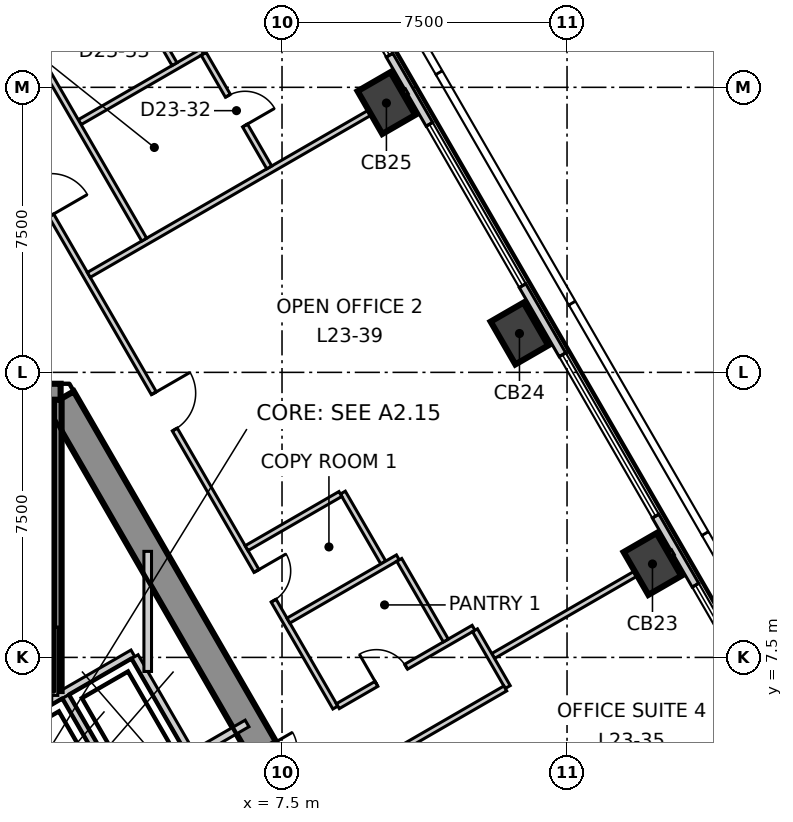
"""IFC4 building model, lengths in metres.
Left out: names, types, materials, properties, quantities, classifications, styles, units other than length and angle.
Written with IfcOpenShell. Run it as: python <this file> out.ifc"""

import sys

from ifc_helpers import new_model, si_unit, direction, frame, frame_2d, origin, origin_2d, place, context, subcontext, project, spatial, polyline, rectangle, outline, extrude, element, fill, save


model = new_model("IFC4")
c1 = context("Model", 3, precision=1e-05, world=origin(), true_north=direction((0.0, 1.0)))
c2 = subcontext(c1, "Body", "Model", "MODEL_VIEW")
j1 = project(units=[si_unit("LENGTHUNIT", "METRE"), si_unit("PLANEANGLEUNIT", "RADIAN")], contexts=[c1])
p1 = place(None, origin())
s1 = spatial("IfcSite", under=j1, at=p1, CompositionType="ELEMENT")
p2 = place(p1, origin())
s2 = spatial("IfcBuilding", under=s1, at=p2, CompositionType="ELEMENT")
p3 = place(p2, frame((0.0, 0.0, 104.3)))
s3 = spatial("IfcBuildingStorey", under=s2, at=p3, CompositionType="ELEMENT", Elevation=104.3)
p4 = place(p3, frame((1.674, 14.3, -0.3), z_axis=(0.0, 0.0, 1.0), x_axis=(-1.0, 0.0, 0.0)))
e1 = element("IfcWall", 1, at=p4, inside=s3, PredefinedType="SHEAR", context=c2, shape_type="SweptSolid", body=[
    extrude(outline(polyline([(-0.231, -0.4), (1.674, -0.4), (3.579, -0.4), (3.117, 0.4), (1.674, 0.4), (0.231, 0.4), (-0.231, -0.4)])), origin(), (0.0, 0.0, 1.0), 4.0),
])
p5 = place(p4, frame((0.974, 0.0, 0.3)))
e2 = element("IfcOpeningElement", 2, at=p5, cuts=e1, PredefinedType="OPENING", context=c2, shape_type="SweptSolid", body=[
    extrude(rectangle(XDim=1.4, YDim=2.1, at=frame_2d((0.7, 1.05))), frame((0.0, 0.41, 0.0), z_axis=(0.0, -1.0, 0.0), x_axis=(1.0, 0.0, 0.0)), (0.0, 0.0, 1.0), 0.82),
])
p6 = place(p3, frame((13.221, -5.7, -0.3), z_axis=(0.0, 0.0, 1.0), x_axis=(-0.499995765644, 0.866027848477, 0.0)))
e3 = element("IfcWall", 3, at=p6, inside=s3, PredefinedType="SHEAR", context=c2, shape_type="SweptSolid", body=[
    extrude(outline(polyline([(-0.231, -0.4), (1.732, -0.4), (3.695, -0.4), (5.658, -0.4), (7.621, -0.4), (9.584, -0.4), (11.547, -0.4), (13.51, -0.4), (15.473, -0.4), (17.436, -0.4), (19.399, -0.4), (21.362, -0.4), (23.325, -0.4), (22.863, 0.4), (20.977, 0.4), (19.091, 0.4), (17.205, 0.4), (15.319, 0.4), (13.433, 0.4), (11.547, 0.4), (9.661, 0.4), (7.775, 0.4), (5.889, 0.4), (4.003, 0.4), (2.117, 0.4), (0.231, 0.4), (-0.231, -0.4)])), origin(), (0.0, 0.0, 1.0), 4.0),
])
p7 = place(p6, frame((10.647, 0.0, 0.3)))
e4 = element("IfcOpeningElement", 4, at=p7, cuts=e3, PredefinedType="OPENING", context=c2, shape_type="SweptSolid", body=[
    extrude(rectangle(XDim=1.8, YDim=2.1, at=frame_2d((0.9, 1.05))), frame((0.0, 0.41, 0.0), z_axis=(0.0, -1.0, 0.0), x_axis=(1.0, 0.0, 0.0)), (0.0, 0.0, 1.0), 0.82),
])
p8 = place(p6, frame((5.343, 0.0, 0.3)))
e5 = element("IfcOpeningElement", 5, at=p8, cuts=e3, PredefinedType="OPENING", context=c2, shape_type="SweptSolid", body=[
    extrude(rectangle(XDim=0.9, YDim=2.1, at=frame_2d((0.45, 1.05))), frame((0.0, 0.41, 0.0), z_axis=(0.0, -1.0, 0.0), x_axis=(1.0, 0.0, 0.0)), (0.0, 0.0, 1.0), 0.82),
])
for number, where, z_axis, x_axis in (
    (6, (17.248, 9.958, -0.3), (0.0, 0.0, 1.0), (-0.5, 0.866, 0.0)),
    (7, (13.748, 16.022, -0.3), (0.0, 0.0, 1.0), (-0.5, 0.866, 0.0)),
    (8, (10.247, 22.086, -0.3), (0.0, 0.0, 1.0), (-0.5, 0.866, 0.0)),
):
    element("IfcColumn", number, at=place(p3, frame(where, z_axis=z_axis, x_axis=x_axis)), inside=s3, PredefinedType="COLUMN", context=c2, shape_type="SweptSolid", body=[
        extrude(rectangle(XDim=1.3, YDim=1.0, at=origin_2d()), origin(), (0.0, 0.0, 1.0), 4.0),
    ])
p9 = place(p3, frame((32.51, -15.074, 0.0), z_axis=(0.0, 0.0, 1.0), x_axis=(-0.500008323105, 0.866020598384, 0.0)))
e9 = element("IfcWall", 9, at=p9, inside=s3, PredefinedType="ELEMENTEDWALL", context=c2, shape_type="SweptSolid", body=[
    extrude(rectangle(XDim=58.599, YDim=0.2, at=frame_2d((29.3, 0.0))), origin(), (0.0, 0.0, 1.0), 3.7),
])
p10 = place(p9, frame((2.354, 0.0, 0.9)))
e10 = element("IfcOpeningElement", 10, at=p10, cuts=e9, PredefinedType="OPENING", context=c2, shape_type="SweptSolid", body=[
    extrude(rectangle(XDim=4.9, YDim=2.5, at=frame_2d((2.45, 1.25))), frame((0.0, 0.11, 0.0), z_axis=(0.0, -1.0, 0.0), x_axis=(1.0, 0.0, 0.0)), (0.0, 0.0, 1.0), 0.22),
])
p11 = place(p9, frame((9.355, 0.0, 0.9)))
e11 = element("IfcOpeningElement", 11, at=p11, cuts=e9, PredefinedType="OPENING", context=c2, shape_type="SweptSolid", body=[
    extrude(rectangle(XDim=4.9, YDim=2.5, at=frame_2d((2.45, 1.25))), frame((0.0, 0.11, 0.0), z_axis=(0.0, -1.0, 0.0), x_axis=(1.0, 0.0, 0.0)), (0.0, 0.0, 1.0), 0.22),
])
p12 = place(p9, frame((16.357, 0.0, 0.9)))
e12 = element("IfcOpeningElement", 12, at=p12, cuts=e9, PredefinedType="OPENING", context=c2, shape_type="SweptSolid", body=[
    extrude(rectangle(XDim=4.9, YDim=2.5, at=frame_2d((2.45, 1.25))), frame((0.0, 0.11, 0.0), z_axis=(0.0, -1.0, 0.0), x_axis=(1.0, 0.0, 0.0)), (0.0, 0.0, 1.0), 0.22),
])
p13 = place(p9, frame((23.359, 0.0, 0.9)))
e13 = element("IfcOpeningElement", 13, at=p13, cuts=e9, PredefinedType="OPENING", context=c2, shape_type="SweptSolid", body=[
    extrude(rectangle(XDim=4.9, YDim=2.5, at=frame_2d((2.45, 1.25))), frame((0.0, 0.11, 0.0), z_axis=(0.0, -1.0, 0.0), x_axis=(1.0, 0.0, 0.0)), (0.0, 0.0, 1.0), 0.22),
])
p14 = place(p9, frame((30.36, 0.0, 0.9)))
e14 = element("IfcOpeningElement", 14, at=p14, cuts=e9, PredefinedType="OPENING", context=c2, shape_type="SweptSolid", body=[
    extrude(rectangle(XDim=4.9, YDim=2.5, at=frame_2d((2.45, 1.25))), frame((0.0, 0.11, 0.0), z_axis=(0.0, -1.0, 0.0), x_axis=(1.0, 0.0, 0.0)), (0.0, 0.0, 1.0), 0.22),
])
p15 = place(p9, frame((37.362, 0.0, 0.9)))
e15 = element("IfcOpeningElement", 15, at=p15, cuts=e9, PredefinedType="OPENING", context=c2, shape_type="SweptSolid", body=[
    extrude(rectangle(XDim=4.9, YDim=2.5, at=frame_2d((2.45, 1.25))), frame((0.0, 0.11, 0.0), z_axis=(0.0, -1.0, 0.0), x_axis=(1.0, 0.0, 0.0)), (0.0, 0.0, 1.0), 0.22),
])
p16 = place(p9, frame((44.364, 0.0, 0.9)))
e16 = element("IfcOpeningElement", 16, at=p16, cuts=e9, PredefinedType="OPENING", context=c2, shape_type="SweptSolid", body=[
    extrude(rectangle(XDim=4.9, YDim=2.5, at=frame_2d((2.45, 1.25))), frame((0.0, 0.11, 0.0), z_axis=(0.0, -1.0, 0.0), x_axis=(1.0, 0.0, 0.0)), (0.0, 0.0, 1.0), 0.22),
])
p17 = place(p9, frame((51.365, 0.0, 0.9)))
e17 = element("IfcOpeningElement", 17, at=p17, cuts=e9, PredefinedType="OPENING", context=c2, shape_type="SweptSolid", body=[
    extrude(rectangle(XDim=4.9, YDim=2.5, at=frame_2d((2.45, 1.25))), frame((0.0, 0.11, 0.0), z_axis=(0.0, -1.0, 0.0), x_axis=(1.0, 0.0, 0.0)), (0.0, 0.0, 1.0), 0.22),
])
p18 = place(p3, frame((13.055, 7.537, 0.0), z_axis=(0.0, 0.0, 1.0), x_axis=(0.86601735395, 0.500013942463, 0.0)))
e18 = element("IfcWall", 18, at=p18, inside=s3, PredefinedType="PARTITIONING", context=c2, shape_type="SweptSolid", body=[
    extrude(rectangle(XDim=5.462, YDim=0.15, at=frame_2d((2.731, 0.0))), origin(), (0.0, 0.0, 1.0), 3.2),
])
p19 = place(p3, frame((0.076, 21.468, 0.0), z_axis=(0.0, 0.0, 1.0), x_axis=(0.500024127084, -0.866011473558, 0.0)))
e19 = element("IfcWall", 19, at=p19, inside=s3, PredefinedType="PARTITIONING", context=c2, shape_type="SweptSolid", body=[
    extrude(rectangle(XDim=17.654, YDim=0.15, at=frame_2d((8.827, 0.0))), origin(), (0.0, 0.0, 1.0), 3.7),
])
p20 = place(p19, frame((8.104, 0.0, 0.0)))
e20 = element("IfcOpeningElement", 20, at=p20, cuts=e19, PredefinedType="OPENING", context=c2, shape_type="SweptSolid", body=[
    extrude(rectangle(XDim=1.1, YDim=2.1, at=frame_2d((0.55, 1.05))), frame((0.0, 0.085, 0.0), z_axis=(0.0, -1.0, 0.0), x_axis=(1.0, 0.0, 0.0)), (0.0, 0.0, 1.0), 0.17),
])
p21 = place(p19, frame((13.504, 0.0, 0.0)))
e21 = element("IfcOpeningElement", 21, at=p21, cuts=e19, PredefinedType="OPENING", context=c2, shape_type="SweptSolid", body=[
    extrude(rectangle(XDim=0.9, YDim=2.1, at=frame_2d((0.45, 1.05))), frame((0.0, 0.085, 0.0), z_axis=(0.0, -1.0, 0.0), x_axis=(1.0, 0.0, 0.0)), (0.0, 0.0, 1.0), 0.17),
])
p22 = place(p19, frame((1.6, 0.0, 0.0)))
e22 = element("IfcOpeningElement", 22, at=p22, cuts=e19, PredefinedType="OPENING", context=c2, shape_type="SweptSolid", body=[
    extrude(rectangle(XDim=1.1, YDim=2.1, at=frame_2d((0.55, 1.05))), frame((0.0, 0.085, 0.0), z_axis=(0.0, -1.0, 0.0), x_axis=(1.0, 0.0, 0.0)), (0.0, 0.0, 1.0), 0.17),
])
p23 = place(p3, frame((2.416, 17.565, 0.0), z_axis=(0.0, 0.0, 1.0), x_axis=(0.86603284879, 0.49998710465, 0.0)))
e23 = element("IfcWall", 23, at=p23, inside=s3, PredefinedType="PARTITIONING", context=c2, shape_type="SweptSolid", body=[
    extrude(rectangle(XDim=9.662, YDim=0.15, at=frame_2d((4.831, 0.0))), origin(), (0.0, 0.0, 1.0), 3.7),
])
p24 = place(p3, frame((9.101, 11.836, 0.0), z_axis=(0.0, 0.0, 1.0), x_axis=(0.500266112279, -0.865871709265, 0.0)))
e24 = element("IfcWall", 24, at=p24, inside=s3, PredefinedType="PARTITIONING", context=c2, shape_type="SweptSolid", body=[
    extrude(rectangle(XDim=2.125, YDim=0.15, at=frame_2d((1.062, 0.0))), origin(), (0.0, 0.0, 1.0), 3.7),
])
p25 = place(p3, frame((6.568, 10.374, 0.0), z_axis=(0.0, 0.0, 1.0), x_axis=(0.865982980443, 0.500073472185, 0.0)))
e25 = element("IfcWall", 25, at=p25, inside=s3, PredefinedType="PARTITIONING", context=c2, shape_type="SweptSolid", body=[
    extrude(rectangle(XDim=2.85, YDim=0.15, at=frame_2d((1.425, 0.0))), origin(), (0.0, 0.0, 1.0), 3.7),
])
p26 = place(p3, frame((7.668, 8.468, 0.0), z_axis=(0.0, 0.0, 1.0), x_axis=(0.865993651241, 0.500054992986, 0.0)))
e26 = element("IfcWall", 26, at=p26, inside=s3, PredefinedType="PARTITIONING", context=c2, shape_type="SweptSolid", body=[
    extrude(rectangle(XDim=3.326, YDim=0.15, at=frame_2d((1.663, 0.0))), origin(), (0.0, 0.0, 1.0), 3.7),
])
p27 = place(p3, frame((8.969, 6.217, 0.0), z_axis=(0.0, 0.0, 1.0), x_axis=(0.865997263264, 0.500048737644, 0.0)))
e27 = element("IfcWall", 27, at=p27, inside=s3, PredefinedType="PARTITIONING", context=c2, shape_type="SweptSolid", body=[
    extrude(rectangle(XDim=4.124, YDim=0.15, at=frame_2d((2.062, 0.0))), origin(), (0.0, 0.0, 1.0), 3.7),
])
p28 = place(p27, frame((1.174, 0.0, 0.0)))
e28 = element("IfcOpeningElement", 28, at=p28, cuts=e27, PredefinedType="OPENING", context=c2, shape_type="SweptSolid", body=[
    extrude(rectangle(XDim=0.9, YDim=2.1, at=frame_2d((0.45, 1.05))), frame((0.0, 0.085, 0.0), z_axis=(0.0, -1.0, 0.0), x_axis=(1.0, 0.0, 0.0)), (0.0, 0.0, 1.0), 0.17),
])
p29 = place(p3, frame((10.585, 10.066, 0.0), z_axis=(0.0, 0.0, 1.0), x_axis=(0.500018594424, -0.866014668023, 0.0)))
e29 = element("IfcWall", 29, at=p29, inside=s3, PredefinedType="PARTITIONING", context=c2, shape_type="SweptSolid", body=[
    extrude(rectangle(XDim=2.45, YDim=0.15, at=frame_2d((1.225, 0.0))), origin(), (0.0, 0.0, 1.0), 3.7),
])
p30 = place(p3, frame((12.578, 8.214, 0.0), z_axis=(0.0, 0.0, 1.0), x_axis=(0.499746958151, -0.866171448282, 0.0)))
e30 = element("IfcWall", 30, at=p30, inside=s3, PredefinedType="PARTITIONING", context=c2, shape_type="SweptSolid", body=[
    extrude(rectangle(XDim=1.725, YDim=0.15, at=frame_2d((0.863, 0.0))), origin(), (0.0, 0.0, 1.0), 3.7),
])
p31 = place(p3, frame((9.869, 4.658, 0.0), z_axis=(0.0, 0.0, 1.0), x_axis=(0.865929493314, 0.500166085025, 0.0)))
e31 = element("IfcWall", 31, at=p31, inside=s3, PredefinedType="PARTITIONING", context=c2, shape_type="SweptSolid", body=[
    extrude(rectangle(XDim=4.049, YDim=0.15, at=frame_2d((2.024, 0.0))), origin(), (0.0, 0.0, 1.0), 3.7),
])
p32 = place(p3, frame((2.175, 21.583, 0.0), z_axis=(0.0, 0.0, 1.0), x_axis=(0.866068800491, 0.499924827166, 0.0)))
e32 = element("IfcWall", 32, at=p32, inside=s3, PredefinedType="PARTITIONING", context=c2, shape_type="SweptSolid", body=[
    extrude(rectangle(XDim=3.725, YDim=0.15, at=frame_2d((1.862, 0.0))), origin(), (0.0, 0.0, 1.0), 3.7),
])
p33 = place(p3, frame((3.608, 24.95, 0.0), z_axis=(0.0, 0.0, 1.0), x_axis=(0.500266112279, -0.865871709265, 0.0)))
e33 = element("IfcWall", 33, at=p33, inside=s3, PredefinedType="PARTITIONING", context=c2, shape_type="SweptSolid", body=[
    extrude(rectangle(XDim=2.125, YDim=0.15, at=frame_2d((1.062, 0.0))), origin(), (0.0, 0.0, 1.0), 3.7),
])
p34 = place(p3, frame((1.01, 23.45, 0.0), z_axis=(0.0, 0.0, 1.0), x_axis=(0.865917290158, 0.500187211558, 0.0)))
e34 = element("IfcWall", 34, at=p34, inside=s3, PredefinedType="PARTITIONING", context=c2, shape_type="SweptSolid", body=[
    extrude(rectangle(XDim=2.925, YDim=0.15, at=frame_2d((1.463, 0.0))), origin(), (0.0, 0.0, 1.0), 3.7),
])
p35 = place(p34, frame((1.05, 0.0, 0.0)))
e35 = element("IfcOpeningElement", 35, at=p35, cuts=e34, PredefinedType="OPENING", context=c2, shape_type="SweptSolid", body=[
    extrude(rectangle(XDim=0.9, YDim=2.1, at=frame_2d((0.45, 1.05))), frame((0.0, 0.085, 0.0), z_axis=(0.0, -1.0, 0.0), x_axis=(1.0, 0.0, 0.0)), (0.0, 0.0, 1.0), 0.17),
])
p36 = place(p3, frame((1.048, 23.385, 0.0), z_axis=(0.0, 0.0, 1.0), x_axis=(0.499991765245, -0.86603015807, 0.0)))
e36 = element("IfcWall", 36, at=p36, inside=s3, PredefinedType="PARTITIONING", context=c2, shape_type="SweptSolid", body=[
    extrude(rectangle(XDim=5.65, YDim=0.15, at=frame_2d((2.825, 0.0))), origin(), (0.0, 0.0, 1.0), 3.7),
])
p37 = place(p3, frame((5.439, 23.38, 0.0), z_axis=(0.0, 0.0, 1.0), x_axis=(0.500020560727, -0.866013532718, 0.0)))
e37 = element("IfcWall", 37, at=p37, inside=s3, PredefinedType="PARTITIONING", context=c2, shape_type="SweptSolid", body=[
    extrude(rectangle(XDim=3.45, YDim=0.15, at=frame_2d((1.725, 0.0))), origin(), (0.0, 0.0, 1.0), 3.7),
])
p38 = place(p37, frame((1.275, 0.0, 0.0)))
e38 = element("IfcOpeningElement", 38, at=p38, cuts=e37, PredefinedType="OPENING", context=c2, shape_type="SweptSolid", body=[
    extrude(rectangle(XDim=0.9, YDim=2.1, at=frame_2d((0.45, 1.05))), frame((0.0, 0.085, 0.0), z_axis=(0.0, -1.0, 0.0), x_axis=(1.0, 0.0, 0.0)), (0.0, 0.0, 1.0), 0.17),
])
p39 = place(p3, frame((-0.002, 5.541, 0.0), z_axis=(0.0, 0.0, 1.0), x_axis=(0.86600155993, 0.500041296494, 0.0)))
e39 = element("IfcWall", 39, at=p39, inside=s3, PredefinedType="SOLIDWALL", context=c2, shape_type="SweptSolid", body=[
    extrude(rectangle(XDim=4.132, YDim=0.2, at=frame_2d((2.066, 0.0))), origin(), (0.0, 0.0, 1.0), 3.7),
])
p40 = place(p3, frame((0.0, 5.4, 0.0), z_axis=(0.0, 0.0, 1.0), x_axis=(0.500103862429, -0.865965430478, 0.0)))
e40 = element("IfcWall", 40, at=p40, inside=s3, PredefinedType="SOLIDWALL", context=c2, shape_type="SweptSolid", body=[
    extrude(rectangle(XDim=2.973, YDim=0.2, at=frame_2d((1.487, 0.0))), origin(), (0.0, 0.0, 1.0), 3.7),
])
p41 = place(p40, frame((0.937, 0.0, 0.0)))
e41 = element("IfcOpeningElement", 41, at=p41, cuts=e40, PredefinedType="OPENING", context=c2, shape_type="SweptSolid", body=[
    extrude(rectangle(XDim=1.1, YDim=2.1, at=frame_2d((0.55, 1.05))), frame((0.0, 0.11, 0.0), z_axis=(0.0, -1.0, 0.0), x_axis=(1.0, 0.0, 0.0)), (0.0, 0.0, 1.0), 0.22),
])
p42 = place(p3, frame((1.577, 2.874, 0.0), z_axis=(0.0, 0.0, 1.0), x_axis=(0.866073694534, 0.499916348638, 0.0)))
e42 = element("IfcWall", 42, at=p42, inside=s3, PredefinedType="SOLIDWALL", context=c2, shape_type="SweptSolid", body=[
    extrude(rectangle(XDim=5.777, YDim=0.2, at=frame_2d((2.888, 0.0))), origin(), (0.0, 0.0, 1.0), 3.7),
])
p43 = place(p42, frame((2.497, 0.0, 0.0)))
e43 = element("IfcOpeningElement", 43, at=p43, cuts=e42, PredefinedType="OPENING", context=c2, shape_type="SweptSolid", body=[
    extrude(rectangle(XDim=1.1, YDim=2.1, at=frame_2d((0.55, 1.05))), frame((0.0, 0.11, 0.0), z_axis=(0.0, -1.0, 0.0), x_axis=(1.0, 0.0, 0.0)), (0.0, 0.0, 1.0), 0.22),
])
for number, where, z_axis, x_axis in (
    (44, (3.626, 7.52, 0.0), (0.0, 0.0, 1.0), (0.5, -0.866, 0.0)),
    (45, (1.807, 6.47, 0.0), (0.0, 0.0, 1.0), (0.5, -0.866, 0.0)),
):
    element("IfcWall", number, at=place(p3, frame(where, z_axis=z_axis, x_axis=x_axis)), inside=s3, PredefinedType="SOLIDWALL", context=c2, shape_type="SweptSolid", body=[
        extrude(rectangle(XDim=2.9, YDim=0.2, at=frame_2d((1.45, 0.0))), origin(), (0.0, 0.0, 1.0), 3.7),
    ])
p44 = place(p3, frame((3.966, 7.13, 0.0), z_axis=(0.0, 0.0, 1.0), x_axis=(0.0, 1.0, 0.0)))
e46 = element("IfcWall", 46, at=p44, inside=s3, PredefinedType="SOLIDWALL", context=c2, shape_type="SweptSolid", body=[
    extrude(rectangle(XDim=3.16, YDim=0.2, at=frame_2d((1.58, 0.0))), origin(), (0.0, 0.0, 1.0), 3.7),
])
p45 = place(p3, frame((1.6, 6.615, 0.0), z_axis=(0.0, 0.0, 1.0), x_axis=(0.0, 1.0, 0.0)))
e47 = element("IfcWall", 47, at=p45, inside=s3, PredefinedType="SOLIDWALL", context=c2, shape_type="SweptSolid", body=[
    extrude(rectangle(XDim=7.665, YDim=0.2, at=frame_2d((3.833, 0.0))), origin(), (0.0, 0.0, 1.0), 3.7),
])
p46 = place(p13, origin())
e48 = element("IfcWindow", 48, at=p46, inside=s3, PartitioningType="SINGLE_PANEL", PredefinedType="WINDOW", context=c2, shape_type="SweptSolid", body=[
    extrude(rectangle(XDim=4.9, YDim=2.5, at=frame_2d((2.45, 1.25))), frame((0.0, 0.03, 0.0), z_axis=(0.0, -1.0, 0.0), x_axis=(1.0, 0.0, 0.0)), (0.0, 0.0, 1.0), 0.06),
])
fill(e13, e48)
p47 = place(p14, origin())
e49 = element("IfcWindow", 49, at=p47, inside=s3, PartitioningType="SINGLE_PANEL", PredefinedType="WINDOW", context=c2, shape_type="SweptSolid", body=[
    extrude(rectangle(XDim=4.9, YDim=2.5, at=frame_2d((2.45, 1.25))), frame((0.0, 0.03, 0.0), z_axis=(0.0, -1.0, 0.0), x_axis=(1.0, 0.0, 0.0)), (0.0, 0.0, 1.0), 0.06),
])
fill(e14, e49)
p48 = place(p15, origin())
e50 = element("IfcWindow", 50, at=p48, inside=s3, PartitioningType="SINGLE_PANEL", PredefinedType="WINDOW", context=c2, shape_type="SweptSolid", body=[
    extrude(rectangle(XDim=4.9, YDim=2.5, at=frame_2d((2.45, 1.25))), frame((0.0, 0.03, 0.0), z_axis=(0.0, -1.0, 0.0), x_axis=(1.0, 0.0, 0.0)), (0.0, 0.0, 1.0), 0.06),
])
fill(e15, e50)
p49 = place(p16, origin())
e51 = element("IfcWindow", 51, at=p49, inside=s3, PartitioningType="SINGLE_PANEL", PredefinedType="WINDOW", context=c2, shape_type="SweptSolid", body=[
    extrude(rectangle(XDim=4.9, YDim=2.5, at=frame_2d((2.45, 1.25))), frame((0.0, 0.03, 0.0), z_axis=(0.0, -1.0, 0.0), x_axis=(1.0, 0.0, 0.0)), (0.0, 0.0, 1.0), 0.06),
])
fill(e16, e51)
p50 = place(p20, origin())
e52 = element("IfcDoor", 52, at=p50, inside=s3, OperationType="SINGLE_SWING_RIGHT", PredefinedType="DOOR", context=c2, shape_type="SweptSolid", body=[
    extrude(rectangle(XDim=1.1, YDim=2.1, at=frame_2d((0.55, 1.05))), frame((0.0, 0.025, 0.0), z_axis=(0.0, -1.0, 0.0), x_axis=(1.0, 0.0, 0.0)), (0.0, 0.0, 1.0), 0.05),
])
fill(e20, e52)
p51 = place(p28, origin())
e53 = element("IfcDoor", 53, at=p51, inside=s3, OperationType="SINGLE_SWING_RIGHT", PredefinedType="DOOR", context=c2, shape_type="SweptSolid", body=[
    extrude(rectangle(XDim=0.9, YDim=2.1, at=frame_2d((0.45, 1.05))), frame((0.0, 0.025, 0.0), z_axis=(0.0, -1.0, 0.0), x_axis=(1.0, 0.0, 0.0)), (0.0, 0.0, 1.0), 0.05),
])
fill(e28, e53)
p52 = place(p21, origin())
e54 = element("IfcDoor", 54, at=p52, inside=s3, OperationType="SINGLE_SWING_RIGHT", PredefinedType="DOOR", context=c2, shape_type="SweptSolid", body=[
    extrude(rectangle(XDim=0.9, YDim=2.1, at=frame_2d((0.45, 1.05))), frame((0.0, 0.025, 0.0), z_axis=(0.0, -1.0, 0.0), x_axis=(1.0, 0.0, 0.0)), (0.0, 0.0, 1.0), 0.05),
])
fill(e21, e54)
p53 = place(p38, origin())
e55 = element("IfcDoor", 55, at=p53, inside=s3, OperationType="SINGLE_SWING_LEFT", PredefinedType="DOOR", context=c2, shape_type="SweptSolid", body=[
    extrude(rectangle(XDim=0.9, YDim=2.1, at=frame_2d((0.45, 1.05))), frame((0.0, 0.025, 0.0), z_axis=(0.0, -1.0, 0.0), x_axis=(1.0, 0.0, 0.0)), (0.0, 0.0, 1.0), 0.05),
])
fill(e38, e55)
save(model, sys.argv[1])
